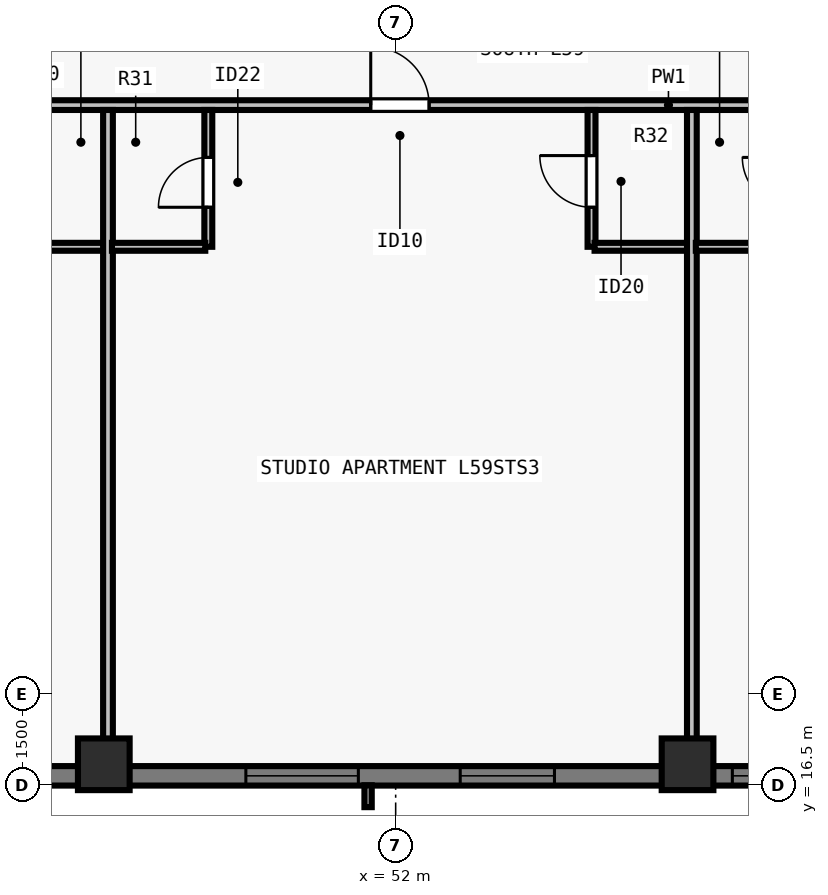
"""IFC4 building model, lengths in metres.
Left out: names, types, materials, properties, quantities, classifications, styles, units other than length and angle.
Written with IfcOpenShell. Run it as: python <this file> out.ifc"""

import sys

from ifc_helpers import new_model, si_unit, direction, frame, frame_2d, origin, origin_2d, place, context, subcontext, project, spatial, rectangle, extrude, element, fill, save


model = new_model("IFC4")
c1 = context("Model", 3, precision=1e-05, world=origin(), true_north=direction((0.0, 1.0)))
c2 = subcontext(c1, "Body", "Model", "MODEL_VIEW")
j1 = project(units=[si_unit("LENGTHUNIT", "METRE"), si_unit("PLANEANGLEUNIT", "RADIAN")], contexts=[c1])
p1 = place(None, origin())
s1 = spatial("IfcSite", under=j1, at=p1, CompositionType="ELEMENT")
p2 = place(p1, origin())
s2 = spatial("IfcBuilding", under=s1, at=p2, CompositionType="ELEMENT")
p3 = place(p2, frame((0.0, 0.0, 216.5)))
s3 = spatial("IfcBuildingStorey", under=s2, at=p3, CompositionType="ELEMENT", Elevation=216.5)
for number, where, z_axis, x_axis in (
    (1, (47.2, 16.85, 0.0), (0.0, 0.0, 1.0), (1.0, 0.0, 0.0)),
    (2, (56.8, 16.85, 0.0), (0.0, 0.0, 1.0), (1.0, 0.0, 0.0)),
):
    element("IfcColumn", number, at=place(p3, frame(where, z_axis=z_axis, x_axis=x_axis)), inside=s3, PredefinedType="COLUMN", context=c2, shape_type="SweptSolid", body=[
        extrude(rectangle(XDim=0.85, YDim=0.85, at=origin_2d()), origin(), (0.0, 0.0, 1.0), 3.5),
    ])
p4 = place(p3, frame((69.5, 16.66, 0.0), z_axis=(0.0, 0.0, 1.0), x_axis=(-1.0, 0.0, 0.0)))
e3 = element("IfcWall", 3, at=p4, inside=s3, PredefinedType="SOLIDWALL", context=c2, shape_type="SweptSolid", body=[
    extrude(rectangle(XDim=34.702, YDim=0.32, at=frame_2d((17.351, 0.0))), origin(), (0.0, 0.0, 1.0), 3.29),
])
p5 = place(p4, frame((5.062, 0.0, 0.8)))
e4 = element("IfcOpeningElement", 4, at=p5, cuts=e3, PredefinedType="OPENING", context=c2, shape_type="SweptSolid", body=[
    extrude(rectangle(XDim=1.85, YDim=1.678, at=frame_2d((0.925, 0.839))), frame((0.0, 0.17, 0.0), z_axis=(0.0, -1.0, 0.0), x_axis=(1.0, 0.0, 0.0)), (0.0, 0.0, 1.0), 0.34),
])
p6 = place(p4, frame((8.138, 0.0, 0.8)))
e5 = element("IfcOpeningElement", 5, at=p6, cuts=e3, PredefinedType="OPENING", context=c2, shape_type="SweptSolid", body=[
    extrude(rectangle(XDim=1.55, YDim=1.678, at=frame_2d((0.775, 0.839))), frame((0.0, 0.17, 0.0), z_axis=(0.0, -1.0, 0.0), x_axis=(1.0, 0.0, 0.0)), (0.0, 0.0, 1.0), 0.34),
])
p7 = place(p4, frame((10.113, 0.0, 0.8)))
e6 = element("IfcOpeningElement", 6, at=p7, cuts=e3, PredefinedType="OPENING", context=c2, shape_type="SweptSolid", body=[
    extrude(rectangle(XDim=1.85, YDim=1.678, at=frame_2d((0.925, 0.839))), frame((0.0, 0.17, 0.0), z_axis=(0.0, -1.0, 0.0), x_axis=(1.0, 0.0, 0.0)), (0.0, 0.0, 1.0), 0.34),
])
p8 = place(p4, frame((14.888, 0.0, 0.8)))
e7 = element("IfcOpeningElement", 7, at=p8, cuts=e3, PredefinedType="OPENING", context=c2, shape_type="SweptSolid", body=[
    extrude(rectangle(XDim=1.55, YDim=1.678, at=frame_2d((0.775, 0.839))), frame((0.0, 0.17, 0.0), z_axis=(0.0, -1.0, 0.0), x_axis=(1.0, 0.0, 0.0)), (0.0, 0.0, 1.0), 0.34),
])
p9 = place(p4, frame((18.114, 0.0, 0.8)))
e8 = element("IfcOpeningElement", 8, at=p9, cuts=e3, PredefinedType="OPENING", context=c2, shape_type="SweptSolid", body=[
    extrude(rectangle(XDim=1.85, YDim=1.678, at=frame_2d((0.925, 0.839))), frame((0.0, 0.17, 0.0), z_axis=(0.0, -1.0, 0.0), x_axis=(1.0, 0.0, 0.0)), (0.0, 0.0, 1.0), 0.34),
])
p10 = place(p4, frame((24.864, 0.0, 0.8)))
e9 = element("IfcOpeningElement", 9, at=p10, cuts=e3, PredefinedType="OPENING", context=c2, shape_type="SweptSolid", body=[
    extrude(rectangle(XDim=1.85, YDim=1.678, at=frame_2d((0.925, 0.839))), frame((0.0, 0.17, 0.0), z_axis=(0.0, -1.0, 0.0), x_axis=(1.0, 0.0, 0.0)), (0.0, 0.0, 1.0), 0.34),
])
p11 = place(p4, frame((28.389, 0.0, 0.8)))
e10 = element("IfcOpeningElement", 10, at=p11, cuts=e3, PredefinedType="OPENING", context=c2, shape_type="SweptSolid", body=[
    extrude(rectangle(XDim=1.55, YDim=1.678, at=frame_2d((0.775, 0.839))), frame((0.0, 0.17, 0.0), z_axis=(0.0, -1.0, 0.0), x_axis=(1.0, 0.0, 0.0)), (0.0, 0.0, 1.0), 0.34),
])
p12 = place(p4, frame((30.71, 0.0, 0.8)))
e11 = element("IfcOpeningElement", 11, at=p12, cuts=e3, PredefinedType="OPENING", context=c2, shape_type="SweptSolid", body=[
    extrude(rectangle(XDim=0.9, YDim=1.678, at=frame_2d((0.45, 0.839))), frame((0.0, 0.17, 0.0), z_axis=(0.0, -1.0, 0.0), x_axis=(1.0, 0.0, 0.0)), (0.0, 0.0, 1.0), 0.34),
])
p13 = place(p3, frame((29.805, 27.69, 0.0), z_axis=(0.0, 0.0, 1.0), x_axis=(1.0, 0.0, 0.0)))
e12 = element("IfcWall", 12, at=p13, inside=s3, PredefinedType="PARTITIONING", context=c2, shape_type="SweptSolid", body=[
    extrude(rectangle(XDim=44.39, YDim=0.16, at=frame_2d((22.195, 0.0))), origin(), (0.0, 0.0, 1.0), 2.958),
])
p14 = place(p13, frame((4.279, 0.0, 0.0)))
e13 = element("IfcOpeningElement", 13, at=p14, cuts=e12, PredefinedType="OPENING", context=c2, shape_type="SweptSolid", body=[
    extrude(rectangle(XDim=0.96, YDim=2.18, at=frame_2d((0.48, 1.09))), frame((0.0, 0.09, 0.0), z_axis=(0.0, -1.0, 0.0), x_axis=(1.0, 0.0, 0.0)), (0.0, 0.0, 1.0), 0.18),
])
p15 = place(p13, frame((12.953, 0.0, 0.0)))
e14 = element("IfcOpeningElement", 14, at=p15, cuts=e12, PredefinedType="OPENING", context=c2, shape_type="SweptSolid", body=[
    extrude(rectangle(XDim=0.96, YDim=2.18, at=frame_2d((0.48, 1.09))), frame((0.0, 0.09, 0.0), z_axis=(0.0, -1.0, 0.0), x_axis=(1.0, 0.0, 0.0)), (0.0, 0.0, 1.0), 0.18),
])
p16 = place(p13, frame((21.785, 0.0, 0.0)))
e15 = element("IfcOpeningElement", 15, at=p16, cuts=e12, PredefinedType="OPENING", context=c2, shape_type="SweptSolid", body=[
    extrude(rectangle(XDim=0.96, YDim=2.18, at=frame_2d((0.48, 1.09))), frame((0.0, 0.09, 0.0), z_axis=(0.0, -1.0, 0.0), x_axis=(1.0, 0.0, 0.0)), (0.0, 0.0, 1.0), 0.18),
])
p17 = place(p13, frame((30.617, 0.0, 0.0)))
e16 = element("IfcOpeningElement", 16, at=p17, cuts=e12, PredefinedType="OPENING", context=c2, shape_type="SweptSolid", body=[
    extrude(rectangle(XDim=0.96, YDim=2.18, at=frame_2d((0.48, 1.09))), frame((0.0, 0.09, 0.0), z_axis=(0.0, -1.0, 0.0), x_axis=(1.0, 0.0, 0.0)), (0.0, 0.0, 1.0), 0.18),
])
p18 = place(p13, frame((39.221, 0.0, 0.0)))
e17 = element("IfcOpeningElement", 17, at=p18, cuts=e12, PredefinedType="OPENING", context=c2, shape_type="SweptSolid", body=[
    extrude(rectangle(XDim=0.96, YDim=2.18, at=frame_2d((0.48, 1.09))), frame((0.0, 0.09, 0.0), z_axis=(0.0, -1.0, 0.0), x_axis=(1.0, 0.0, 0.0)), (0.0, 0.0, 1.0), 0.18),
])
p19 = place(p3, frame((45.669, 25.36, 0.0), z_axis=(0.0, 0.0, 1.0), x_axis=(1.0, 0.0, 0.0)))
e18 = element("IfcWall", 18, at=p19, inside=s3, PredefinedType="PLUMBINGWALL", context=c2, shape_type="SweptSolid", body=[
    extrude(rectangle(XDim=1.6, YDim=0.13, at=frame_2d((0.8, 0.0))), origin(), (0.0, 0.0, 1.0), 3.29),
])
p20 = place(p3, frame((47.269, 16.805, 0.0), z_axis=(0.0, 0.0, 1.0), x_axis=(0.0, 1.0, 0.0)))
e19 = element("IfcWall", 19, at=p20, inside=s3, PredefinedType="PARTITIONING", context=c2, shape_type="SweptSolid", body=[
    extrude(rectangle(XDim=10.805, YDim=0.16, at=frame_2d((5.403, 0.0))), origin(), (0.0, 0.0, 1.0), 2.573),
])
p21 = place(p3, frame((48.919, 25.36, 0.0), z_axis=(0.0, 0.0, 1.0), x_axis=(0.0, 1.0, 0.0)))
e20 = element("IfcWall", 20, at=p21, inside=s3, PredefinedType="PLUMBINGWALL", context=c2, shape_type="SweptSolid", body=[
    extrude(rectangle(XDim=2.25, YDim=0.13, at=frame_2d((1.125, 0.0))), origin(), (0.0, 0.0, 1.0), 3.29),
])
p22 = place(p21, frame((0.65, 0.0, 0.0)))
e21 = element("IfcOpeningElement", 21, at=p22, cuts=e20, PredefinedType="OPENING", context=c2, shape_type="SweptSolid", body=[
    extrude(rectangle(XDim=0.82, YDim=2.1, at=frame_2d((0.41, 1.05))), frame((0.0, 0.075, 0.0), z_axis=(0.0, -1.0, 0.0), x_axis=(1.0, 0.0, 0.0)), (0.0, 0.0, 1.0), 0.15),
])
p23 = place(p3, frame((47.334, 25.36, 0.0), z_axis=(0.0, 0.0, 1.0), x_axis=(1.0, 0.0, 0.0)))
e22 = element("IfcWall", 22, at=p23, inside=s3, PredefinedType="PLUMBINGWALL", context=c2, shape_type="SweptSolid", body=[
    extrude(rectangle(XDim=1.535, YDim=0.13, at=frame_2d((0.768, 0.0))), origin(), (0.0, 0.0, 1.0), 3.29),
])
p24 = place(p3, frame((55.221, 25.36, 0.0), z_axis=(0.0, 0.0, 1.0), x_axis=(0.0, 1.0, 0.0)))
e23 = element("IfcWall", 23, at=p24, inside=s3, PredefinedType="PLUMBINGWALL", context=c2, shape_type="SweptSolid", body=[
    extrude(rectangle(XDim=2.25, YDim=0.13, at=frame_2d((1.125, 0.0))), origin(), (0.0, 0.0, 1.0), 3.29),
])
p25 = place(p24, frame((0.65, 0.0, 0.0)))
e24 = element("IfcOpeningElement", 24, at=p25, cuts=e23, PredefinedType="OPENING", context=c2, shape_type="SweptSolid", body=[
    extrude(rectangle(XDim=0.85, YDim=2.1, at=frame_2d((0.425, 1.05))), frame((0.0, 0.075, 0.0), z_axis=(0.0, -1.0, 0.0), x_axis=(1.0, 0.0, 0.0)), (0.0, 0.0, 1.0), 0.15),
])
p26 = place(p3, frame((55.271, 25.36, 0.0), z_axis=(0.0, 0.0, 1.0), x_axis=(1.0, 0.0, 0.0)))
e25 = element("IfcWall", 25, at=p26, inside=s3, PredefinedType="PLUMBINGWALL", context=c2, shape_type="SweptSolid", body=[
    extrude(rectangle(XDim=1.6, YDim=0.13, at=frame_2d((0.8, 0.0))), origin(), (0.0, 0.0, 1.0), 3.29),
])
p27 = place(p3, frame((56.871, 16.805, 0.0), z_axis=(0.0, 0.0, 1.0), x_axis=(0.0, 1.0, 0.0)))
e26 = element("IfcWall", 26, at=p27, inside=s3, PredefinedType="PARTITIONING", context=c2, shape_type="SweptSolid", body=[
    extrude(rectangle(XDim=10.805, YDim=0.16, at=frame_2d((5.403, 0.0))), origin(), (0.0, 0.0, 1.0), 2.573),
])
p28 = place(p3, frame((56.936, 25.36, 0.0), z_axis=(0.0, 0.0, 1.0), x_axis=(1.0, 0.0, 0.0)))
e27 = element("IfcWall", 27, at=p28, inside=s3, PredefinedType="PLUMBINGWALL", context=c2, shape_type="SweptSolid", body=[
    extrude(rectangle(XDim=1.535, YDim=0.13, at=frame_2d((0.768, 0.0))), origin(), (0.0, 0.0, 1.0), 3.29),
])
p29 = place(p7, origin())
e28 = element("IfcWindow", 28, at=p29, inside=s3, PartitioningType="SINGLE_PANEL", PredefinedType="WINDOW", context=c2, shape_type="SweptSolid", body=[
    extrude(rectangle(XDim=1.85, YDim=1.678, at=frame_2d((0.925, 0.839))), frame((0.0, -0.05, 0.0), z_axis=(0.0, -1.0, 0.0), x_axis=(1.0, 0.0, 0.0)), (0.0, 0.0, 1.0), 0.06),
])
fill(e6, e28)
p30 = place(p8, origin())
e29 = element("IfcWindow", 29, at=p30, inside=s3, PartitioningType="SINGLE_PANEL", PredefinedType="WINDOW", context=c2, shape_type="SweptSolid", body=[
    extrude(rectangle(XDim=1.55, YDim=1.678, at=frame_2d((0.775, 0.839))), frame((0.0, -0.05, 0.0), z_axis=(0.0, -1.0, 0.0), x_axis=(1.0, 0.0, 0.0)), (0.0, 0.0, 1.0), 0.06),
])
fill(e7, e29)
p31 = place(p9, origin())
e30 = element("IfcWindow", 30, at=p31, inside=s3, PartitioningType="SINGLE_PANEL", PredefinedType="WINDOW", context=c2, shape_type="SweptSolid", body=[
    extrude(rectangle(XDim=1.85, YDim=1.678, at=frame_2d((0.925, 0.839))), frame((0.0, -0.05, 0.0), z_axis=(0.0, -1.0, 0.0), x_axis=(1.0, 0.0, 0.0)), (0.0, 0.0, 1.0), 0.06),
])
fill(e8, e30)
p32 = place(p22, origin())
e31 = element("IfcDoor", 31, at=p32, inside=s3, OperationType="SINGLE_SWING_LEFT", PredefinedType="DOOR", context=c2, shape_type="SweptSolid", body=[
    extrude(rectangle(XDim=0.82, YDim=2.1, at=frame_2d((0.41, 1.05))), frame((0.0, 0.025, 0.0), z_axis=(0.0, -1.0, 0.0), x_axis=(1.0, 0.0, 0.0)), (0.0, 0.0, 1.0), 0.05),
])
fill(e21, e31)
p33 = place(p25, origin())
e32 = element("IfcDoor", 32, at=p33, inside=s3, OperationType="SINGLE_SWING_RIGHT", PredefinedType="DOOR", context=c2, shape_type="SweptSolid", body=[
    extrude(rectangle(XDim=0.85, YDim=2.1, at=frame_2d((0.425, 1.05))), frame((0.0, 0.025, 0.0), z_axis=(0.0, -1.0, 0.0), x_axis=(1.0, 0.0, 0.0)), (0.0, 0.0, 1.0), 0.05),
])
fill(e24, e32)
p34 = place(p16, origin())
e33 = element("IfcDoor", 33, at=p34, inside=s3, OperationType="SINGLE_SWING_LEFT", PredefinedType="DOOR", context=c2, shape_type="SweptSolid", body=[
    extrude(rectangle(XDim=0.96, YDim=2.18, at=frame_2d((0.48, 1.09))), frame((0.0, 0.025, 0.0), z_axis=(0.0, -1.0, 0.0), x_axis=(1.0, 0.0, 0.0)), (0.0, 0.0, 1.0), 0.05),
])
fill(e15, e33)
save(model, sys.argv[1])
